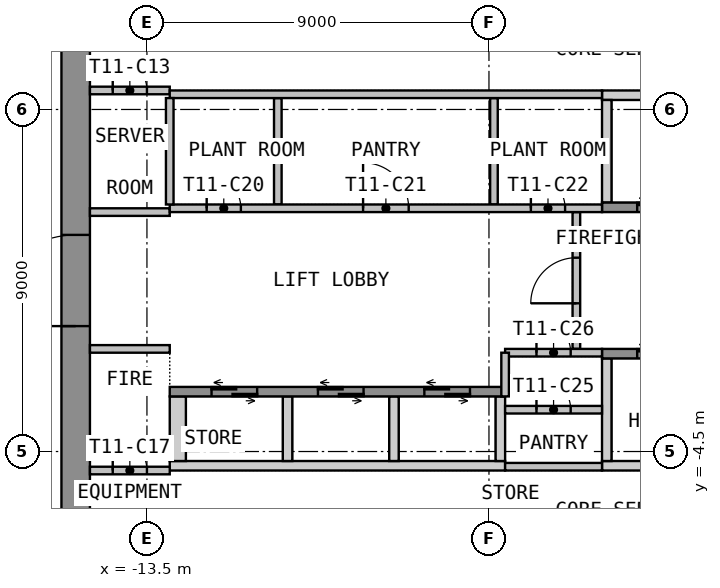
"""IFC4 building model, lengths in metres.
Left out: names, types, materials, properties, quantities, classifications, styles, units other than length and angle.
Written with IfcOpenShell. Run it as: python <this file> out.ifc"""

import sys

from ifc_helpers import new_model, si_unit, direction, frame, frame_2d, origin, place, context, subcontext, project, spatial, polyline, rectangle, outline, extrude, element, fill, save


model = new_model("IFC4")
c1 = context("Model", 3, precision=1e-05, world=origin(), true_north=direction((0.0, 1.0)))
c2 = subcontext(c1, "Body", "Model", "MODEL_VIEW")
j1 = project(units=[si_unit("LENGTHUNIT", "METRE"), si_unit("PLANEANGLEUNIT", "RADIAN")], contexts=[c1])
p1 = place(None, origin())
s1 = spatial("IfcSite", under=j1, at=p1, CompositionType="ELEMENT")
p2 = place(p1, origin())
s2 = spatial("IfcBuilding", under=s1, at=p2, CompositionType="ELEMENT")
p3 = place(p2, frame((0.0, 0.0, 156.0)))
s3 = spatial("IfcBuildingStorey", under=s2, at=p3, CompositionType="ELEMENT", Elevation=156.0)
p4 = place(p3, frame((-15.375, -12.75, 0.0), z_axis=(0.0, 0.0, 1.0), x_axis=(0.0, 1.0, 0.0)))
e1 = element("IfcWall", 1, at=p4, inside=s3, PredefinedType="SHEAR", context=c2, shape_type="SweptSolid", body=[
    extrude(rectangle(XDim=25.5, YDim=0.75, at=frame_2d((12.75, 0.0))), origin(), (0.0, 0.0, 1.0), 3.575),
])
p5 = place(p4, frame((11.55, 0.0, 0.0)))
e2 = element("IfcOpeningElement", 2, at=p5, cuts=e1, PredefinedType="OPENING", context=c2, shape_type="SweptSolid", body=[
    extrude(rectangle(XDim=2.4, YDim=2.1, at=frame_2d((1.2, 1.05))), frame((0.0, 0.385, 0.0), z_axis=(0.0, -1.0, 0.0), x_axis=(1.0, 0.0, 0.0)), (0.0, 0.0, 1.0), 0.77),
])
p6 = place(p3, origin())
e3 = element("IfcWall", 3, at=p6, inside=s3, PredefinedType="SHEAR", context=c2, shape_type="SweptSolid", body=[
    extrude(outline(polyline([(-1.525, 4.75), (1.525, 4.75), (1.525, 5.0), (-1.525, 5.0), (-1.525, 4.75)])), origin(), (0.0, 0.0, 1.0), 3.575),
])
p7 = place(p3, origin())
e4 = element("IfcWall", 4, at=p7, inside=s3, PredefinedType="SHEAR", context=c2, shape_type="SweptSolid", body=[
    extrude(outline(polyline([(-1.525, 2.05), (-1.275, 2.05), (-1.275, 4.75), (-1.525, 4.75), (-1.525, 2.05)])), origin(), (0.0, 0.0, 1.0), 3.575),
])
p8 = place(p3, frame((-1.525, 1.925, 0.0), z_axis=(0.0, 0.0, 1.0), x_axis=(1.0, 0.0, 0.0)))
e5 = element("IfcWall", 5, at=p8, inside=s3, PredefinedType="SHEAR", context=c2, shape_type="SweptSolid", body=[
    extrude(rectangle(XDim=3.05, YDim=0.25, at=frame_2d((1.525, 0.0))), origin(), (0.0, 0.0, 1.0), 3.575),
])
p9 = place(p8, frame((0.925, 0.0, 0.0)))
e6 = element("IfcOpeningElement", 6, at=p9, cuts=e5, PredefinedType="OPENING", context=c2, shape_type="SweptSolid", body=[
    extrude(rectangle(XDim=1.2, YDim=2.1, at=frame_2d((0.6, 1.05))), frame((0.0, 0.135, 0.0), z_axis=(0.0, -1.0, 0.0), x_axis=(1.0, 0.0, 0.0)), (0.0, 0.0, 1.0), 0.27),
])
p10 = place(p3, origin())
e7 = element("IfcWall", 7, at=p10, inside=s3, PredefinedType="SHEAR", context=c2, shape_type="SweptSolid", body=[
    extrude(outline(polyline([(-12.9, -5.0), (-4.075, -5.0), (-4.075, -4.75), (-12.9, -4.75), (-12.9, -5.0)])), origin(), (0.0, 0.0, 1.0), 3.575),
])
p11 = place(p3, origin())
e8 = element("IfcWall", 8, at=p11, inside=s3, PredefinedType="SHEAR", context=c2, shape_type="SweptSolid", body=[
    extrude(outline(polyline([(-1.525, -5.0), (12.9, -5.0), (12.9, -4.75), (-1.525, -4.75), (-1.525, -5.0)])), origin(), (0.0, 0.0, 1.0), 3.575),
])
p12 = place(p3, origin())
e9 = element("IfcWall", 9, at=p12, inside=s3, PredefinedType="SHEAR", context=c2, shape_type="SweptSolid", body=[
    extrude(outline(polyline([(-12.9, -4.75), (-12.475, -4.75), (-12.475, -3.05), (-12.9, -3.05), (-12.9, -4.75)])), origin(), (0.0, 0.0, 1.0), 3.575),
])
p13 = place(p3, origin())
e10 = element("IfcWall", 10, at=p13, inside=s3, PredefinedType="SHEAR", context=c2, shape_type="SweptSolid", body=[
    extrude(outline(polyline([(-9.925, -4.75), (-9.675, -4.75), (-9.675, -3.05), (-9.925, -3.05), (-9.925, -4.75)])), origin(), (0.0, 0.0, 1.0), 3.575),
])
p14 = place(p3, origin())
e11 = element("IfcWall", 11, at=p14, inside=s3, PredefinedType="SHEAR", context=c2, shape_type="SweptSolid", body=[
    extrude(outline(polyline([(-7.125, -4.75), (-6.875, -4.75), (-6.875, -3.05), (-7.125, -3.05), (-7.125, -4.75)])), origin(), (0.0, 0.0, 1.0), 3.575),
])
p15 = place(p3, origin())
e12 = element("IfcWall", 12, at=p15, inside=s3, PredefinedType="SHEAR", context=c2, shape_type="SweptSolid", body=[
    extrude(outline(polyline([(-4.325, -4.75), (-4.075, -4.75), (-4.075, -3.05), (-4.325, -3.05), (-4.325, -4.75)])), origin(), (0.0, 0.0, 1.0), 3.575),
])
p16 = place(p3, origin())
e13 = element("IfcWall", 13, at=p16, inside=s3, PredefinedType="SHEAR", context=c2, shape_type="SweptSolid", body=[
    extrude(outline(polyline([(-1.525, -4.75), (-1.275, -4.75), (-1.275, -2.05), (-1.525, -2.05), (-1.525, -4.75)])), origin(), (0.0, 0.0, 1.0), 3.575),
])
p17 = place(p3, frame((-12.9, -2.925, 0.0), z_axis=(0.0, 0.0, 1.0), x_axis=(1.0, 0.0, 0.0)))
e14 = element("IfcWall", 14, at=p17, inside=s3, PredefinedType="SHEAR", context=c2, shape_type="SweptSolid", body=[
    extrude(rectangle(XDim=8.825, YDim=0.25, at=frame_2d((4.413, 0.0))), origin(), (0.0, 0.0, 1.0), 3.575),
])
p18 = place(p17, frame((1.1, 0.0, 0.0)))
e15 = element("IfcOpeningElement", 15, at=p18, cuts=e14, PredefinedType="OPENING", context=c2, shape_type="SweptSolid", body=[
    extrude(rectangle(XDim=1.2, YDim=2.1, at=frame_2d((0.6, 1.05))), frame((0.0, 0.135, 0.0), z_axis=(0.0, -1.0, 0.0), x_axis=(1.0, 0.0, 0.0)), (0.0, 0.0, 1.0), 0.27),
])
p19 = place(p17, frame((3.9, 0.0, 0.0)))
e16 = element("IfcOpeningElement", 16, at=p19, cuts=e14, PredefinedType="OPENING", context=c2, shape_type="SweptSolid", body=[
    extrude(rectangle(XDim=1.2, YDim=2.1, at=frame_2d((0.6, 1.05))), frame((0.0, 0.135, 0.0), z_axis=(0.0, -1.0, 0.0), x_axis=(1.0, 0.0, 0.0)), (0.0, 0.0, 1.0), 0.27),
])
p20 = place(p17, frame((6.7, 0.0, 0.0)))
e17 = element("IfcOpeningElement", 17, at=p20, cuts=e14, PredefinedType="OPENING", context=c2, shape_type="SweptSolid", body=[
    extrude(rectangle(XDim=1.2, YDim=2.1, at=frame_2d((0.6, 1.05))), frame((0.0, 0.135, 0.0), z_axis=(0.0, -1.0, 0.0), x_axis=(1.0, 0.0, 0.0)), (0.0, 0.0, 1.0), 0.27),
])
p21 = place(p3, frame((-1.525, -1.925, 0.0), z_axis=(0.0, 0.0, 1.0), x_axis=(1.0, 0.0, 0.0)))
e18 = element("IfcWall", 18, at=p21, inside=s3, PredefinedType="SHEAR", context=c2, shape_type="SweptSolid", body=[
    extrude(rectangle(XDim=14.425, YDim=0.25, at=frame_2d((7.212, 0.0))), origin(), (0.0, 0.0, 1.0), 3.575),
])
p22 = place(p21, frame((0.925, 0.0, 0.0)))
e19 = element("IfcOpeningElement", 19, at=p22, cuts=e18, PredefinedType="OPENING", context=c2, shape_type="SweptSolid", body=[
    extrude(rectangle(XDim=1.2, YDim=2.1, at=frame_2d((0.6, 1.05))), frame((0.0, 0.135, 0.0), z_axis=(0.0, -1.0, 0.0), x_axis=(1.0, 0.0, 0.0)), (0.0, 0.0, 1.0), 0.27),
])
p23 = place(p21, frame((3.725, 0.0, 0.0)))
e20 = element("IfcOpeningElement", 20, at=p23, cuts=e18, PredefinedType="OPENING", context=c2, shape_type="SweptSolid", body=[
    extrude(rectangle(XDim=1.2, YDim=2.1, at=frame_2d((0.6, 1.05))), frame((0.0, 0.135, 0.0), z_axis=(0.0, -1.0, 0.0), x_axis=(1.0, 0.0, 0.0)), (0.0, 0.0, 1.0), 0.27),
])
p24 = place(p3, frame((-2.2, -1.8, 0.0), z_axis=(0.0, 0.0, 1.0), x_axis=(0.0, 1.0, 0.0)))
e21 = element("IfcWall", 21, at=p24, inside=s3, PredefinedType="PARTITIONING", context=c2, shape_type="SweptSolid", body=[
    extrude(rectangle(XDim=3.6, YDim=0.2, at=frame_2d((1.8, 0.0))), origin(), (0.0, 0.0, 1.0), 3.575),
])
p25 = place(p24, frame((1.2, 0.0, 0.0)))
e22 = element("IfcOpeningElement", 22, at=p25, cuts=e21, PredefinedType="OPENING", context=c2, shape_type="SweptSolid", body=[
    extrude(rectangle(XDim=1.2, YDim=2.1, at=frame_2d((0.6, 1.05))), frame((0.0, 0.11, 0.0), z_axis=(0.0, -1.0, 0.0), x_axis=(1.0, 0.0, 0.0)), (0.0, 0.0, 1.0), 0.22),
])
p26 = place(p3, frame((-15.0, 5.0, 0.0), z_axis=(0.0, 0.0, 1.0), x_axis=(1.0, 0.0, 0.0)))
e23 = element("IfcWall", 23, at=p26, inside=s3, PredefinedType="PARTITIONING", context=c2, shape_type="SweptSolid", body=[
    extrude(rectangle(XDim=2.1, YDim=0.2, at=frame_2d((1.05, 0.0))), origin(), (0.0, 0.0, 1.0), 3.575),
])
p27 = place(p26, frame((0.6, 0.0, 0.0)))
e24 = element("IfcOpeningElement", 24, at=p27, cuts=e23, PredefinedType="OPENING", context=c2, shape_type="SweptSolid", body=[
    extrude(rectangle(XDim=0.9, YDim=2.1, at=frame_2d((0.45, 1.05))), frame((0.0, 0.11, 0.0), z_axis=(0.0, -1.0, 0.0), x_axis=(1.0, 0.0, 0.0)), (0.0, 0.0, 1.0), 0.22),
])
p28 = place(p3, frame((-15.0, 1.8, 0.0), z_axis=(0.0, 0.0, 1.0), x_axis=(1.0, 0.0, 0.0)))
e25 = element("IfcWall", 25, at=p28, inside=s3, PredefinedType="PARTITIONING", context=c2, shape_type="SweptSolid", body=[
    extrude(rectangle(XDim=2.1, YDim=0.2, at=frame_2d((1.05, 0.0))), origin(), (0.0, 0.0, 1.0), 3.575),
])
p29 = place(p3, frame((-15.0, -5.0, 0.0), z_axis=(0.0, 0.0, 1.0), x_axis=(1.0, 0.0, 0.0)))
e26 = element("IfcWall", 26, at=p29, inside=s3, PredefinedType="PARTITIONING", context=c2, shape_type="SweptSolid", body=[
    extrude(rectangle(XDim=2.1, YDim=0.2, at=frame_2d((1.05, 0.0))), origin(), (0.0, 0.0, 1.0), 3.575),
])
p30 = place(p29, frame((0.6, 0.0, 0.0)))
e27 = element("IfcOpeningElement", 27, at=p30, cuts=e26, PredefinedType="OPENING", context=c2, shape_type="SweptSolid", body=[
    extrude(rectangle(XDim=0.9, YDim=2.1, at=frame_2d((0.45, 1.05))), frame((0.0, 0.11, 0.0), z_axis=(0.0, -1.0, 0.0), x_axis=(1.0, 0.0, 0.0)), (0.0, 0.0, 1.0), 0.22),
])
p31 = place(p3, frame((-15.0, -1.8, 0.0), z_axis=(0.0, 0.0, 1.0), x_axis=(1.0, 0.0, 0.0)))
e28 = element("IfcWall", 28, at=p31, inside=s3, PredefinedType="PARTITIONING", context=c2, shape_type="SweptSolid", body=[
    extrude(rectangle(XDim=2.1, YDim=0.2, at=frame_2d((1.05, 0.0))), origin(), (0.0, 0.0, 1.0), 3.575),
])
for number, where, z_axis, x_axis in (
    (29, (-10.056, 2.0, 0.0), (0.0, 0.0, 1.0), (0.0, 1.0, 0.0)),
    (30, (-4.369, 2.0, 0.0), (0.0, 0.0, 1.0), (0.0, 1.0, 0.0)),
):
    element("IfcWall", number, at=place(p3, frame(where, z_axis=z_axis, x_axis=x_axis)), inside=s3, PredefinedType="PARTITIONING", context=c2, shape_type="SweptSolid", body=[
        extrude(rectangle(XDim=2.8, YDim=0.2, at=frame_2d((1.4, 0.0))), origin(), (0.0, 0.0, 1.0), 3.575),
    ])
p32 = place(p3, frame((-12.9, 1.9, 0.0), z_axis=(0.0, 0.0, 1.0), x_axis=(1.0, 0.0, 0.0)))
e31 = element("IfcWall", 31, at=p32, inside=s3, PredefinedType="PARTITIONING", context=c2, shape_type="SweptSolid", body=[
    extrude(rectangle(XDim=11.375, YDim=0.2, at=frame_2d((5.688, 0.0))), origin(), (0.0, 0.0, 1.0), 3.575),
])
p33 = place(p32, frame((0.972, 0.0, 0.0)))
e32 = element("IfcOpeningElement", 32, at=p33, cuts=e31, PredefinedType="OPENING", context=c2, shape_type="SweptSolid", body=[
    extrude(rectangle(XDim=0.9, YDim=2.1, at=frame_2d((0.45, 1.05))), frame((0.0, 0.11, 0.0), z_axis=(0.0, -1.0, 0.0), x_axis=(1.0, 0.0, 0.0)), (0.0, 0.0, 1.0), 0.22),
])
p34 = place(p32, frame((5.087, 0.0, 0.0)))
e33 = element("IfcOpeningElement", 33, at=p34, cuts=e31, PredefinedType="OPENING", context=c2, shape_type="SweptSolid", body=[
    extrude(rectangle(XDim=1.2, YDim=2.1, at=frame_2d((0.6, 1.05))), frame((0.0, 0.11, 0.0), z_axis=(0.0, -1.0, 0.0), x_axis=(1.0, 0.0, 0.0)), (0.0, 0.0, 1.0), 0.22),
])
p35 = place(p32, frame((9.503, 0.0, 0.0)))
e34 = element("IfcOpeningElement", 34, at=p35, cuts=e31, PredefinedType="OPENING", context=c2, shape_type="SweptSolid", body=[
    extrude(rectangle(XDim=0.9, YDim=2.1, at=frame_2d((0.45, 1.05))), frame((0.0, 0.11, 0.0), z_axis=(0.0, -1.0, 0.0), x_axis=(1.0, 0.0, 0.0)), (0.0, 0.0, 1.0), 0.22),
])
p36 = place(p3, frame((-12.9, 4.9, 0.0), z_axis=(0.0, 0.0, 1.0), x_axis=(1.0, 0.0, 0.0)))
e35 = element("IfcWall", 35, at=p36, inside=s3, PredefinedType="PARTITIONING", context=c2, shape_type="SweptSolid", body=[
    extrude(rectangle(XDim=11.375, YDim=0.2, at=frame_2d((5.688, 0.0))), origin(), (0.0, 0.0, 1.0), 3.575),
])
p37 = place(p3, frame((-12.9, 2.0, 0.0), z_axis=(0.0, 0.0, 1.0), x_axis=(0.0, 1.0, 0.0)))
e36 = element("IfcWall", 36, at=p37, inside=s3, PredefinedType="PARTITIONING", context=c2, shape_type="SweptSolid", body=[
    extrude(rectangle(XDim=2.8, YDim=0.2, at=frame_2d((1.4, 0.0))), origin(), (0.0, 0.0, 1.0), 3.575),
])
p38 = place(p3, frame((-4.075, -3.4, 0.0), z_axis=(0.0, 0.0, 1.0), x_axis=(1.0, 0.0, 0.0)))
e37 = element("IfcWall", 37, at=p38, inside=s3, PredefinedType="PARTITIONING", context=c2, shape_type="SweptSolid", body=[
    extrude(rectangle(XDim=2.55, YDim=0.2, at=frame_2d((1.275, 0.0))), origin(), (0.0, 0.0, 1.0), 3.575),
])
p39 = place(p38, frame((0.825, 0.0, 0.0)))
e38 = element("IfcOpeningElement", 38, at=p39, cuts=e37, PredefinedType="OPENING", context=c2, shape_type="SweptSolid", body=[
    extrude(rectangle(XDim=0.9, YDim=2.1, at=frame_2d((0.45, 1.05))), frame((0.0, 0.11, 0.0), z_axis=(0.0, -1.0, 0.0), x_axis=(1.0, 0.0, 0.0)), (0.0, 0.0, 1.0), 0.22),
])
p40 = place(p3, frame((-4.075, -1.9, 0.0), z_axis=(0.0, 0.0, 1.0), x_axis=(1.0, 0.0, 0.0)))
e39 = element("IfcWall", 39, at=p40, inside=s3, PredefinedType="PARTITIONING", context=c2, shape_type="SweptSolid", body=[
    extrude(rectangle(XDim=2.55, YDim=0.2, at=frame_2d((1.275, 0.0))), origin(), (0.0, 0.0, 1.0), 3.575),
])
p41 = place(p40, frame((0.825, 0.0, 0.0)))
e40 = element("IfcOpeningElement", 40, at=p41, cuts=e39, PredefinedType="OPENING", context=c2, shape_type="SweptSolid", body=[
    extrude(rectangle(XDim=0.9, YDim=2.1, at=frame_2d((0.45, 1.05))), frame((0.0, 0.11, 0.0), z_axis=(0.0, -1.0, 0.0), x_axis=(1.0, 0.0, 0.0)), (0.0, 0.0, 1.0), 0.22),
])
p42 = place(p3, frame((-4.075, -4.9, 0.0), z_axis=(0.0, 0.0, 1.0), x_axis=(1.0, 0.0, 0.0)))
e41 = element("IfcWall", 41, at=p42, inside=s3, PredefinedType="PARTITIONING", context=c2, shape_type="SweptSolid", body=[
    extrude(rectangle(XDim=2.55, YDim=0.2, at=frame_2d((1.275, 0.0))), origin(), (0.0, 0.0, 1.0), 3.575),
])
p43 = place(p3, frame((-4.075, -1.9, 0.0), z_axis=(0.0, 0.0, 1.0), x_axis=(0.0, -1.0, 0.0)))
e42 = element("IfcWall", 42, at=p43, inside=s3, PredefinedType="PARTITIONING", context=c2, shape_type="SweptSolid", body=[
    extrude(rectangle(XDim=1.15, YDim=0.2, at=frame_2d((0.575, 0.0))), origin(), (0.0, 0.0, 1.0), 3.575),
])
p44 = place(p5, origin())
e43 = element("IfcDoor", 43, at=p44, inside=s3, OperationType="DOUBLE_DOOR_DOUBLE_SWING", PredefinedType="DOOR", context=c2, shape_type="SweptSolid", body=[
    extrude(rectangle(XDim=2.4, YDim=2.1, at=frame_2d((1.2, 1.05))), frame((0.0, 0.025, 0.0), z_axis=(0.0, -1.0, 0.0), x_axis=(1.0, 0.0, 0.0)), (0.0, 0.0, 1.0), 0.05),
])
fill(e2, e43)
p45 = place(p9, origin())
e44 = element("IfcDoor", 44, at=p45, inside=s3, OperationType="DOUBLE_DOOR_SLIDING", PredefinedType="DOOR", context=c2, shape_type="SweptSolid", body=[
    extrude(rectangle(XDim=1.2, YDim=2.1, at=frame_2d((0.6, 1.05))), frame((0.0, 0.025, 0.0), z_axis=(0.0, -1.0, 0.0), x_axis=(1.0, 0.0, 0.0)), (0.0, 0.0, 1.0), 0.05),
])
fill(e6, e44)
p46 = place(p18, origin())
e45 = element("IfcDoor", 45, at=p46, inside=s3, OperationType="DOUBLE_DOOR_SLIDING", PredefinedType="DOOR", context=c2, shape_type="SweptSolid", body=[
    extrude(rectangle(XDim=1.2, YDim=2.1, at=frame_2d((0.6, 1.05))), frame((0.0, 0.025, 0.0), z_axis=(0.0, -1.0, 0.0), x_axis=(1.0, 0.0, 0.0)), (0.0, 0.0, 1.0), 0.05),
])
fill(e15, e45)
p47 = place(p19, origin())
e46 = element("IfcDoor", 46, at=p47, inside=s3, OperationType="DOUBLE_DOOR_SLIDING", PredefinedType="DOOR", context=c2, shape_type="SweptSolid", body=[
    extrude(rectangle(XDim=1.2, YDim=2.1, at=frame_2d((0.6, 1.05))), frame((0.0, 0.025, 0.0), z_axis=(0.0, -1.0, 0.0), x_axis=(1.0, 0.0, 0.0)), (0.0, 0.0, 1.0), 0.05),
])
fill(e16, e46)
p48 = place(p20, origin())
e47 = element("IfcDoor", 47, at=p48, inside=s3, OperationType="DOUBLE_DOOR_SLIDING", PredefinedType="DOOR", context=c2, shape_type="SweptSolid", body=[
    extrude(rectangle(XDim=1.2, YDim=2.1, at=frame_2d((0.6, 1.05))), frame((0.0, 0.025, 0.0), z_axis=(0.0, -1.0, 0.0), x_axis=(1.0, 0.0, 0.0)), (0.0, 0.0, 1.0), 0.05),
])
fill(e17, e47)
p49 = place(p22, origin())
e48 = element("IfcDoor", 48, at=p49, inside=s3, OperationType="DOUBLE_DOOR_SLIDING", PredefinedType="DOOR", context=c2, shape_type="SweptSolid", body=[
    extrude(rectangle(XDim=1.2, YDim=2.1, at=frame_2d((0.6, 1.05))), frame((0.0, 0.025, 0.0), z_axis=(0.0, -1.0, 0.0), x_axis=(1.0, 0.0, 0.0)), (0.0, 0.0, 1.0), 0.05),
])
fill(e19, e48)
p50 = place(p25, origin())
e49 = element("IfcDoor", 49, at=p50, inside=s3, OperationType="SINGLE_SWING_LEFT", PredefinedType="DOOR", context=c2, shape_type="SweptSolid", body=[
    extrude(rectangle(XDim=1.2, YDim=2.1, at=frame_2d((0.6, 1.05))), frame((0.0, 0.025, 0.0), z_axis=(0.0, -1.0, 0.0), x_axis=(1.0, 0.0, 0.0)), (0.0, 0.0, 1.0), 0.05),
])
fill(e22, e49)
p51 = place(p27, origin())
e50 = element("IfcDoor", 50, at=p51, inside=s3, OperationType="SINGLE_SWING_LEFT", PredefinedType="DOOR", context=c2, shape_type="SweptSolid", body=[
    extrude(rectangle(XDim=0.9, YDim=2.1, at=frame_2d((0.45, 1.05))), frame((0.0, 0.025, 0.0), z_axis=(0.0, -1.0, 0.0), x_axis=(1.0, 0.0, 0.0)), (0.0, 0.0, 1.0), 0.05),
])
fill(e24, e50)
p52 = place(p30, origin())
e51 = element("IfcDoor", 51, at=p52, inside=s3, OperationType="SINGLE_SWING_LEFT", PredefinedType="DOOR", context=c2, shape_type="SweptSolid", body=[
    extrude(rectangle(XDim=0.9, YDim=2.1, at=frame_2d((0.45, 1.05))), frame((0.0, 0.025, 0.0), z_axis=(0.0, -1.0, 0.0), x_axis=(1.0, 0.0, 0.0)), (0.0, 0.0, 1.0), 0.05),
])
fill(e27, e51)
p53 = place(p33, origin())
e52 = element("IfcDoor", 52, at=p53, inside=s3, OperationType="SINGLE_SWING_LEFT", PredefinedType="DOOR", context=c2, shape_type="SweptSolid", body=[
    extrude(rectangle(XDim=0.9, YDim=2.1, at=frame_2d((0.45, 1.05))), frame((0.0, 0.025, 0.0), z_axis=(0.0, -1.0, 0.0), x_axis=(1.0, 0.0, 0.0)), (0.0, 0.0, 1.0), 0.05),
])
fill(e32, e52)
p54 = place(p34, origin())
e53 = element("IfcDoor", 53, at=p54, inside=s3, OperationType="SINGLE_SWING_RIGHT", PredefinedType="DOOR", context=c2, shape_type="SweptSolid", body=[
    extrude(rectangle(XDim=1.2, YDim=2.1, at=frame_2d((0.6, 1.05))), frame((0.0, 0.025, 0.0), z_axis=(0.0, -1.0, 0.0), x_axis=(1.0, 0.0, 0.0)), (0.0, 0.0, 1.0), 0.05),
])
fill(e33, e53)
p55 = place(p35, origin())
e54 = element("IfcDoor", 54, at=p55, inside=s3, OperationType="SINGLE_SWING_LEFT", PredefinedType="DOOR", context=c2, shape_type="SweptSolid", body=[
    extrude(rectangle(XDim=0.9, YDim=2.1, at=frame_2d((0.45, 1.05))), frame((0.0, 0.025, 0.0), z_axis=(0.0, -1.0, 0.0), x_axis=(1.0, 0.0, 0.0)), (0.0, 0.0, 1.0), 0.05),
])
fill(e34, e54)
p56 = place(p39, origin())
e55 = element("IfcDoor", 55, at=p56, inside=s3, OperationType="SINGLE_SWING_LEFT", PredefinedType="DOOR", context=c2, shape_type="SweptSolid", body=[
    extrude(rectangle(XDim=0.9, YDim=2.1, at=frame_2d((0.45, 1.05))), frame((0.0, 0.025, 0.0), z_axis=(0.0, -1.0, 0.0), x_axis=(1.0, 0.0, 0.0)), (0.0, 0.0, 1.0), 0.05),
])
fill(e38, e55)
p57 = place(p41, origin())
e56 = element("IfcDoor", 56, at=p57, inside=s3, OperationType="SINGLE_SWING_LEFT", PredefinedType="DOOR", context=c2, shape_type="SweptSolid", body=[
    extrude(rectangle(XDim=0.9, YDim=2.1, at=frame_2d((0.45, 1.05))), frame((0.0, 0.025, 0.0), z_axis=(0.0, -1.0, 0.0), x_axis=(1.0, 0.0, 0.0)), (0.0, 0.0, 1.0), 0.05),
])
fill(e40, e56)
save(model, sys.argv[1])
